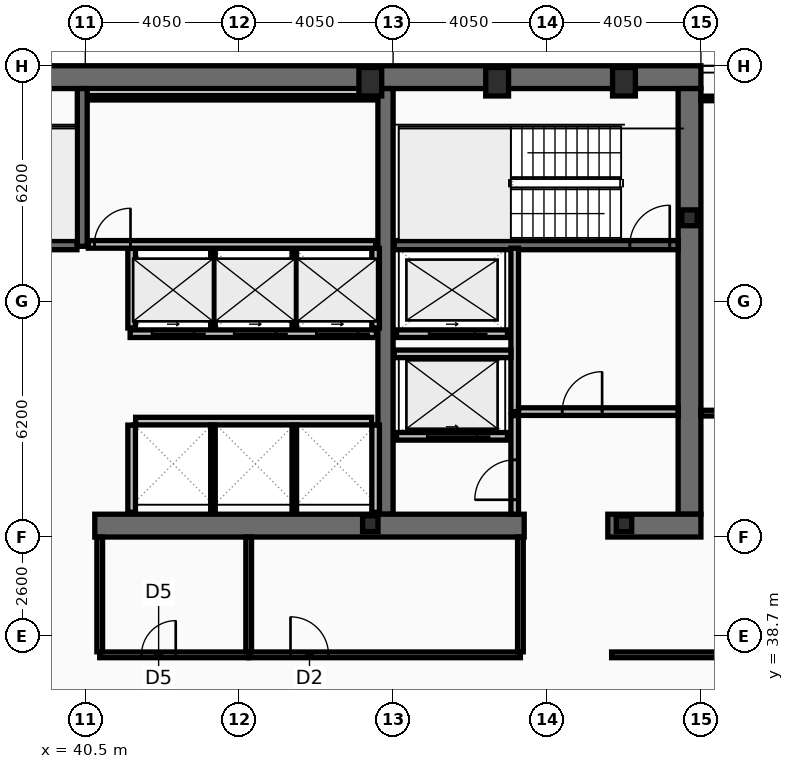
"""IFC4 building model, lengths in metres.
Left out: names, types, materials, properties, quantities, classifications, styles, units other than length and angle.
Written with IfcOpenShell. Run it as: python <this file> out.ifc"""

import sys

from ifc_helpers import new_model, si_unit, direction, frame, frame_2d, origin, origin_2d, place, context, subcontext, project, spatial, rectangle, hollow_rectangle, i_section, extrude, element, fill, save


model = new_model("IFC4")
c1 = context("Model", 3, precision=1e-05, world=origin(), true_north=direction((0.0, 1.0)))
c2 = subcontext(c1, "Body", "Model", "MODEL_VIEW")
j1 = project(units=[si_unit("LENGTHUNIT", "METRE"), si_unit("PLANEANGLEUNIT", "RADIAN")], contexts=[c1])
p1 = place(None, origin())
s1 = spatial("IfcSite", under=j1, at=p1, CompositionType="ELEMENT")
p2 = place(p1, origin())
s2 = spatial("IfcBuilding", under=s1, at=p2, CompositionType="ELEMENT")
p3 = place(p2, frame((0.0, 0.0, 231.8)))
s3 = spatial("IfcBuildingStorey", under=s2, at=p3, CompositionType="ELEMENT", Elevation=231.8)
p4 = place(p3, frame((16.2, 53.4, 0.0), z_axis=(0.0, 0.0, 1.0), x_axis=(1.0, 0.0, 0.0)))
e1 = element("IfcWall", 1, at=p4, inside=s3, PredefinedType="SHEAR", context=c2, shape_type="SweptSolid", body=[
    extrude(rectangle(XDim=40.5, YDim=0.6, at=frame_2d((20.25, 0.0))), origin(), (0.0, 0.0, 1.0), 3.44),
])
p5 = place(p3, frame((56.4, 53.1, 0.0), z_axis=(0.0, 0.0, 1.0), x_axis=(0.0, -1.0, 0.0)))
e2 = element("IfcWall", 2, at=p5, inside=s3, PredefinedType="SHEAR", context=c2, shape_type="SweptSolid", body=[
    extrude(rectangle(XDim=11.2, YDim=0.6, at=frame_2d((5.6, 0.0))), origin(), (0.0, 0.0, 1.0), 3.44),
])
p6 = place(p3, frame((48.4, 41.9, 0.0), z_axis=(0.0, 0.0, 1.0), x_axis=(0.0, 1.0, 0.0)))
e3 = element("IfcWall", 3, at=p6, inside=s3, PredefinedType="SHEAR", context=c2, shape_type="SweptSolid", body=[
    extrude(rectangle(XDim=11.2, YDim=0.4, at=frame_2d((5.6, 0.0))), origin(), (0.0, 0.0, 1.0), 3.44),
])
p7 = place(p3, frame((52.05, 41.6, 0.0), z_axis=(0.0, 0.0, 1.0), x_axis=(-1.0, 0.0, 0.0)))
e4 = element("IfcWall", 4, at=p7, inside=s3, PredefinedType="SHEAR", context=c2, shape_type="SweptSolid", body=[
    extrude(rectangle(XDim=11.3, YDim=0.6, at=frame_2d((5.65, 0.0))), origin(), (0.0, 0.0, 1.0), 3.44),
])
p8 = place(p3, frame((56.7, 41.6, 0.0), z_axis=(0.0, 0.0, 1.0), x_axis=(-1.0, 0.0, 0.0)))
e5 = element("IfcWall", 5, at=p8, inside=s3, PredefinedType="SHEAR", context=c2, shape_type="SweptSolid", body=[
    extrude(rectangle(XDim=2.45, YDim=0.6, at=frame_2d((1.225, 0.0))), origin(), (0.0, 0.0, 1.0), 3.44),
])
p9 = place(p3, frame((40.42, 48.95, 0.0), z_axis=(0.0, 0.0, 1.0), x_axis=(0.0, 1.0, 0.0)))
e6 = element("IfcWall", 6, at=p9, inside=s3, PredefinedType="SHEAR", context=c2, shape_type="SweptSolid", body=[
    extrude(rectangle(XDim=4.15, YDim=0.26, at=frame_2d((2.075, 0.0))), origin(), (0.0, 0.0, 1.0), 3.44),
])
p10 = place(p3, frame((48.63, 48.98, 0.0), z_axis=(0.0, 0.0, 1.0), x_axis=(1.0, 0.0, 0.0)))
e7 = element("IfcWall", 7, at=p10, inside=s3, PredefinedType="SHEAR", context=c2, shape_type="SweptSolid", body=[
    extrude(rectangle(XDim=7.47, YDim=0.24, at=frame_2d((3.735, 0.0))), origin(), (0.0, 0.0, 1.0), 3.44),
])
p11 = place(p10, frame((6.2, 0.0, 0.0)))
e8 = element("IfcOpeningElement", 8, at=p11, cuts=e7, PredefinedType="OPENING", context=c2, shape_type="SweptSolid", body=[
    extrude(rectangle(XDim=1.05, YDim=2.15, at=frame_2d((0.525, 1.075))), frame((0.0, 0.13, 0.0), z_axis=(0.0, -1.0, 0.0), x_axis=(1.0, 0.0, 0.0)), (0.0, 0.0, 1.0), 0.26),
])
p12 = place(p3, frame((32.72, 48.98, 0.0), z_axis=(0.0, 0.0, 1.0), x_axis=(1.0, 0.0, 0.0)))
e9 = element("IfcWall", 9, at=p12, inside=s3, PredefinedType="SHEAR", context=c2, shape_type="SweptSolid", body=[
    extrude(rectangle(XDim=7.56, YDim=0.24, at=frame_2d((3.78, 0.0))), origin(), (0.0, 0.0, 1.0), 3.44),
])
p13 = place(p12, frame((0.22, 0.0, 0.0)))
e10 = element("IfcOpeningElement", 10, at=p13, cuts=e9, PredefinedType="OPENING", context=c2, shape_type="SweptSolid", body=[
    extrude(rectangle(XDim=1.05, YDim=2.15, at=frame_2d((0.525, 1.075))), frame((0.0, 0.13, 0.0), z_axis=(0.0, -1.0, 0.0), x_axis=(1.0, 0.0, 0.0)), (0.0, 0.0, 1.0), 0.26),
])
for number, where, z_axis, x_axis in (
    (11, (48.0, 53.28, 0.0), (0.0, 0.0, 1.0), (1.0, 0.0, 0.0)),
    (12, (51.337, 53.28, 0.0), (0.0, 0.0, 1.0), (1.0, 0.0, 0.0)),
    (13, (54.675, 53.28, 0.0), (0.0, 0.0, 1.0), (1.0, 0.0, 0.0)),
):
    element("IfcColumn", number, at=place(p3, frame(where, z_axis=z_axis, x_axis=x_axis)), inside=s3, PredefinedType="COLUMN", context=c2, shape_type="SweptSolid", body=[
        extrude(hollow_rectangle(XDim=0.6, YDim=0.75, WallThickness=0.045, at=origin_2d()), origin(), (0.0, 0.0, 1.0), 3.6),
    ])
for number, where, z_axis, x_axis in (
    (14, (56.4, 49.7, 0.0), (0.0, 0.0, 1.0), (1.0, 0.0, 0.0)),
    (15, (48.0, 41.65, 0.0), (0.0, 0.0, 1.0), (1.0, 0.0, 0.0)),
    (16, (54.675, 41.65, 0.0), (0.0, 0.0, 1.0), (1.0, 0.0, 0.0)),
):
    element("IfcColumn", number, at=place(p3, frame(where, z_axis=z_axis, x_axis=x_axis)), inside=s3, PredefinedType="COLUMN", context=c2, shape_type="SweptSolid", body=[
        extrude(i_section(OverallWidth=0.406, OverallDepth=0.416, WebThickness=0.03, FlangeThickness=0.048, at=origin_2d()), origin(), (0.0, 0.0, 1.0), 3.6),
    ])
p14 = place(p3, frame((51.61, 43.95, 0.0), z_axis=(0.0, 0.0, 1.0), x_axis=(-1.0, 0.0, 0.0)))
e17 = element("IfcWall", 17, at=p14, inside=s3, PredefinedType="PARTITIONING", context=c2, shape_type="SweptSolid", body=[
    extrude(rectangle(XDim=2.92, YDim=0.2, at=frame_2d((1.46, 0.0))), origin(), (0.0, 0.0, 1.0), 3.44),
])
p15 = place(p14, frame((0.81, 0.0, 0.0)))
e18 = element("IfcOpeningElement", 18, at=p15, cuts=e17, PredefinedType="OPENING", context=c2, shape_type="SweptSolid", body=[
    extrude(rectangle(XDim=1.3, YDim=2.18, at=frame_2d((0.65, 1.09))), frame((0.0, 0.11, 0.0), z_axis=(0.0, -1.0, 0.0), x_axis=(1.0, 0.0, 0.0)), (0.0, 0.0, 1.0), 0.22),
])
p16 = place(p3, frame((51.61, 46.65, 0.0), z_axis=(0.0, 0.0, 1.0), x_axis=(-1.0, 0.0, 0.0)))
e19 = element("IfcWall", 19, at=p16, inside=s3, PredefinedType="PARTITIONING", context=c2, shape_type="SweptSolid", body=[
    extrude(rectangle(XDim=2.92, YDim=0.2, at=frame_2d((1.46, 0.0))), origin(), (0.0, 0.0, 1.0), 3.44),
])
p17 = place(p16, frame((0.86, 0.0, 0.0)))
e20 = element("IfcOpeningElement", 20, at=p17, cuts=e19, PredefinedType="OPENING", context=c2, shape_type="SweptSolid", body=[
    extrude(rectangle(XDim=1.2, YDim=2.18, at=frame_2d((0.6, 1.09))), frame((0.0, 0.11, 0.0), z_axis=(0.0, -1.0, 0.0), x_axis=(1.0, 0.0, 0.0)), (0.0, 0.0, 1.0), 0.22),
])
p18 = place(p3, frame((48.16, 46.65, 0.0), z_axis=(0.0, 0.0, 1.0), x_axis=(-1.0, 0.0, 0.0)))
e21 = element("IfcWall", 21, at=p18, inside=s3, PredefinedType="PARTITIONING", context=c2, shape_type="SweptSolid", body=[
    extrude(rectangle(XDim=6.48, YDim=0.2, at=frame_2d((3.24, 0.0))), origin(), (0.0, 0.0, 1.0), 3.44),
])
p19 = place(p18, frame((4.8, 0.0, 0.0)))
e22 = element("IfcOpeningElement", 22, at=p19, cuts=e21, PredefinedType="OPENING", context=c2, shape_type="SweptSolid", body=[
    extrude(rectangle(XDim=1.1, YDim=2.18, at=frame_2d((0.55, 1.09))), frame((0.0, 0.11, 0.0), z_axis=(0.0, -1.0, 0.0), x_axis=(1.0, 0.0, 0.0)), (0.0, 0.0, 1.0), 0.22),
])
p20 = place(p18, frame((2.64, 0.0, 0.0)))
e23 = element("IfcOpeningElement", 23, at=p20, cuts=e21, PredefinedType="OPENING", context=c2, shape_type="SweptSolid", body=[
    extrude(rectangle(XDim=1.1, YDim=2.18, at=frame_2d((0.55, 1.09))), frame((0.0, 0.11, 0.0), z_axis=(0.0, -1.0, 0.0), x_axis=(1.0, 0.0, 0.0)), (0.0, 0.0, 1.0), 0.22),
])
p21 = place(p18, frame((0.48, 0.0, 0.0)))
e24 = element("IfcOpeningElement", 24, at=p21, cuts=e21, PredefinedType="OPENING", context=c2, shape_type="SweptSolid", body=[
    extrude(rectangle(XDim=1.1, YDim=2.18, at=frame_2d((0.55, 1.09))), frame((0.0, 0.11, 0.0), z_axis=(0.0, -1.0, 0.0), x_axis=(1.0, 0.0, 0.0)), (0.0, 0.0, 1.0), 0.22),
])
p22 = place(p3, frame((51.8, 44.6, 0.0), z_axis=(0.0, 0.0, 1.0), x_axis=(0.0, 1.0, 0.0)))
e25 = element("IfcWall", 25, at=p22, inside=s3, PredefinedType="PARTITIONING", context=c2, shape_type="SweptSolid", body=[
    extrude(rectangle(XDim=4.3, YDim=0.2, at=frame_2d((2.15, 0.0))), origin(), (0.0, 0.0, 1.0), 3.44),
])
p23 = place(p3, frame((51.9, 44.6, 0.0), z_axis=(0.0, 0.0, 1.0), x_axis=(1.0, 0.0, 0.0)))
e26 = element("IfcWall", 26, at=p23, inside=s3, PredefinedType="PARTITIONING", context=c2, shape_type="SweptSolid", body=[
    extrude(rectangle(XDim=4.2, YDim=0.2, at=frame_2d((2.1, 0.0))), origin(), (0.0, 0.0, 1.0), 3.44),
])
p24 = place(p23, frame((1.15, 0.0, 0.0)))
e27 = element("IfcOpeningElement", 27, at=p24, cuts=e26, PredefinedType="OPENING", context=c2, shape_type="SweptSolid", body=[
    extrude(rectangle(XDim=1.05, YDim=2.15, at=frame_2d((0.525, 1.075))), frame((0.0, 0.11, 0.0), z_axis=(0.0, -1.0, 0.0), x_axis=(1.0, 0.0, 0.0)), (0.0, 0.0, 1.0), 0.22),
])
p25 = place(p3, frame((48.63, 46.12, 0.0), z_axis=(0.0, 0.0, 1.0), x_axis=(1.0, 0.0, 0.0)))
e28 = element("IfcWall", 28, at=p25, inside=s3, PredefinedType="PARTITIONING", context=c2, shape_type="SweptSolid", body=[
    extrude(rectangle(XDim=3.07, YDim=0.2, at=frame_2d((1.535, 0.0))), origin(), (0.0, 0.0, 1.0), 3.44),
])
p26 = place(p3, frame((51.8, 41.9, 0.0), z_axis=(0.0, 0.0, 1.0), x_axis=(0.0, 1.0, 0.0)))
e29 = element("IfcWall", 29, at=p26, inside=s3, PredefinedType="PARTITIONING", context=c2, shape_type="SweptSolid", body=[
    extrude(rectangle(XDim=2.595, YDim=0.2, at=frame_2d((1.298, 0.0))), origin(), (0.0, 0.0, 1.0), 3.44),
])
p27 = place(p26, frame((0.38, 0.0, 0.0)))
e30 = element("IfcOpeningElement", 30, at=p27, cuts=e29, PredefinedType="OPENING", context=c2, shape_type="SweptSolid", body=[
    extrude(rectangle(XDim=1.05, YDim=2.15, at=frame_2d((0.525, 1.075))), frame((0.0, 0.11, 0.0), z_axis=(0.0, -1.0, 0.0), x_axis=(1.0, 0.0, 0.0)), (0.0, 0.0, 1.0), 0.22),
])
for number, where, z_axis, x_axis in (
    (31, (41.72, 46.8, 0.0), (0.0, 0.0, 1.0), (0.0, 1.0, 0.0)),
    (32, (48.14, 46.8, 0.0), (0.0, 0.0, 1.0), (0.0, 1.0, 0.0)),
):
    element("IfcWall", number, at=place(p3, frame(where, z_axis=z_axis, x_axis=x_axis)), inside=s3, PredefinedType="PARTITIONING", context=c2, shape_type="SweptSolid", body=[
        extrude(rectangle(XDim=2.095, YDim=0.2, at=frame_2d((1.047, 0.0))), origin(), (0.0, 0.0, 1.0), 3.44),
    ])
for number, where, z_axis, x_axis in (
    (33, (43.86, 46.8, 0.0), (0.0, 0.0, 1.0), (0.0, 1.0, 0.0)),
    (34, (46.0, 46.8, 0.0), (0.0, 0.0, 1.0), (0.0, 1.0, 0.0)),
):
    element("IfcWall", number, at=place(p3, frame(where, z_axis=z_axis, x_axis=x_axis)), inside=s3, PredefinedType="PARTITIONING", context=c2, shape_type="SweptSolid", body=[
        extrude(rectangle(XDim=2.095, YDim=0.12, at=frame_2d((1.047, 0.0))), origin(), (0.0, 0.0, 1.0), 3.44),
    ])
p28 = place(p3, frame((41.825, 44.35, 0.0), z_axis=(0.0, 0.0, 1.0), x_axis=(1.0, 0.0, 0.0)))
e35 = element("IfcWall", 35, at=p28, inside=s3, PredefinedType="PARTITIONING", context=c2, shape_type="SweptSolid", body=[
    extrude(rectangle(XDim=6.21, YDim=0.2, at=frame_2d((3.105, 0.0))), origin(), (0.0, 0.0, 1.0), 3.44),
])
for number, where, z_axis, x_axis in (
    (36, (41.72, 41.95, 0.0), (0.0, 0.0, 1.0), (0.0, 1.0, 0.0)),
    (37, (48.14, 41.95, 0.0), (0.0, 0.0, 1.0), (0.0, 1.0, 0.0)),
):
    element("IfcWall", number, at=place(p3, frame(where, z_axis=z_axis, x_axis=x_axis)), inside=s3, PredefinedType="PARTITIONING", context=c2, shape_type="SweptSolid", body=[
        extrude(rectangle(XDim=2.295, YDim=0.2, at=frame_2d((1.147, 0.0))), origin(), (0.0, 0.0, 1.0), 3.44),
    ])
for number, where, z_axis, x_axis in (
    (38, (43.86, 41.95, 0.0), (0.0, 0.0, 1.0), (0.0, 1.0, 0.0)),
    (39, (46.0, 41.95, 0.0), (0.0, 0.0, 1.0), (0.0, 1.0, 0.0)),
):
    element("IfcWall", number, at=place(p3, frame(where, z_axis=z_axis, x_axis=x_axis)), inside=s3, PredefinedType="PARTITIONING", context=c2, shape_type="SweptSolid", body=[
        extrude(rectangle(XDim=2.295, YDim=0.12, at=frame_2d((1.147, 0.0))), origin(), (0.0, 0.0, 1.0), 3.44),
    ])
p29 = place(p3, frame((40.58, 52.86, 0.0), z_axis=(0.0, 0.0, 1.0), x_axis=(1.0, 0.0, 0.0)))
e40 = element("IfcWall", 40, at=p29, inside=s3, PredefinedType="PARTITIONING", context=c2, shape_type="SweptSolid", body=[
    extrude(rectangle(XDim=7.56, YDim=0.12, at=frame_2d((3.78, 0.0))), origin(), (0.0, 0.0, 1.0), 3.44),
])
p30 = place(p3, frame((40.58, 49.0, 0.0), z_axis=(0.0, 0.0, 1.0), x_axis=(1.0, 0.0, 0.0)))
e41 = element("IfcWall", 41, at=p30, inside=s3, PredefinedType="PARTITIONING", context=c2, shape_type="SweptSolid", body=[
    extrude(rectangle(XDim=7.56, YDim=0.2, at=frame_2d((3.78, 0.0))), origin(), (0.0, 0.0, 1.0), 3.44),
])
p31 = place(p30, frame((0.16, 0.0, 0.0)))
e42 = element("IfcOpeningElement", 42, at=p31, cuts=e41, PredefinedType="OPENING", context=c2, shape_type="SweptSolid", body=[
    extrude(rectangle(XDim=0.95, YDim=2.1, at=frame_2d((0.475, 1.05))), frame((0.0, 0.11, 0.0), z_axis=(0.0, -1.0, 0.0), x_axis=(1.0, 0.0, 0.0)), (0.0, 0.0, 1.0), 0.22),
])
p32 = place(p3, frame((40.88, 38.2, 0.0), z_axis=(0.0, 0.0, 1.0), x_axis=(1.0, 0.0, 0.0)))
e43 = element("IfcWall", 43, at=p32, inside=s3, PredefinedType="PARTITIONING", context=c2, shape_type="SweptSolid", body=[
    extrude(rectangle(XDim=3.92, YDim=0.15, at=frame_2d((1.96, 0.0))), origin(), (0.0, 0.0, 1.0), 2.78),
])
p33 = place(p32, frame((1.1, 0.0, 0.0)))
e44 = element("IfcOpeningElement", 44, at=p33, cuts=e43, PredefinedType="OPENING", context=c2, shape_type="SweptSolid", body=[
    extrude(rectangle(XDim=0.9, YDim=2.05, at=frame_2d((0.45, 1.025))), frame((0.0, 0.085, 0.0), z_axis=(0.0, -1.0, 0.0), x_axis=(1.0, 0.0, 0.0)), (0.0, 0.0, 1.0), 0.17),
])
p34 = place(p3, frame((44.8, 38.2, 0.0), z_axis=(0.0, 0.0, 1.0), x_axis=(1.0, 0.0, 0.0)))
e45 = element("IfcWall", 45, at=p34, inside=s3, PredefinedType="PARTITIONING", context=c2, shape_type="SweptSolid", body=[
    extrude(rectangle(XDim=7.15, YDim=0.15, at=frame_2d((3.575, 0.0))), origin(), (0.0, 0.0, 1.0), 2.78),
])
p35 = place(p34, frame((1.1, 0.0, 0.0)))
e46 = element("IfcOpeningElement", 46, at=p35, cuts=e45, PredefinedType="OPENING", context=c2, shape_type="SweptSolid", body=[
    extrude(rectangle(XDim=1.0, YDim=2.05, at=frame_2d((0.5, 1.025))), frame((0.0, 0.085, 0.0), z_axis=(0.0, -1.0, 0.0), x_axis=(1.0, 0.0, 0.0)), (0.0, 0.0, 1.0), 0.17),
])
for number, where, z_axis, x_axis in (
    (47, (40.88, 38.28, 0.0), (0.0, 0.0, 1.0), (0.0, 1.0, 0.0)),
    (48, (44.8, 38.28, 0.0), (0.0, 0.0, 1.0), (0.0, 1.0, 0.0)),
    (49, (51.95, 38.28, 0.0), (0.0, 0.0, 1.0), (0.0, 1.0, 0.0)),
):
    element("IfcWall", number, at=place(p3, frame(where, z_axis=z_axis, x_axis=x_axis)), inside=s3, PredefinedType="PARTITIONING", context=c2, shape_type="SweptSolid", body=[
        extrude(rectangle(XDim=3.02, YDim=0.15, at=frame_2d((1.51, 0.0))), origin(), (0.0, 0.0, 1.0), 3.44),
    ])
p36 = place(p3, frame((54.35, 38.2, 0.0), z_axis=(0.0, 0.0, 1.0), x_axis=(1.0, 0.0, 0.0)))
e50 = element("IfcWall", 50, at=p36, inside=s3, PredefinedType="PARTITIONING", context=c2, shape_type="SweptSolid", body=[
    extrude(rectangle(XDim=10.52, YDim=0.15, at=frame_2d((5.26, 0.0))), origin(), (0.0, 0.0, 1.0), 2.78),
])
p37 = place(p36, frame((3.25, 0.0, 0.0)))
e51 = element("IfcOpeningElement", 51, at=p37, cuts=e50, PredefinedType="OPENING", context=c2, shape_type="SweptSolid", body=[
    extrude(rectangle(XDim=0.95, YDim=2.05, at=frame_2d((0.475, 1.025))), frame((0.0, 0.085, 0.0), z_axis=(0.0, -1.0, 0.0), x_axis=(1.0, 0.0, 0.0)), (0.0, 0.0, 1.0), 0.17),
])
p38 = place(p3, frame((56.7, 44.56, 0.0), z_axis=(0.0, 0.0, 1.0), x_axis=(1.0, 0.0, 0.0)))
e52 = element("IfcWall", 52, at=p38, inside=s3, PredefinedType="PARTITIONING", context=c2, shape_type="SweptSolid", body=[
    extrude(rectangle(XDim=8.105, YDim=0.15, at=frame_2d((4.052, 0.0))), origin(), (0.0, 0.0, 1.0), 2.83),
])
p39 = place(p38, frame((0.9, 0.0, 0.0)))
e53 = element("IfcOpeningElement", 53, at=p39, cuts=e52, PredefinedType="OPENING", context=c2, shape_type="SweptSolid", body=[
    extrude(rectangle(XDim=0.9, YDim=2.05, at=frame_2d((0.45, 1.025))), frame((0.0, 0.085, 0.0), z_axis=(0.0, -1.0, 0.0), x_axis=(1.0, 0.0, 0.0)), (0.0, 0.0, 1.0), 0.17),
])
p40 = place(p3, frame((56.7, 52.84, 0.0), z_axis=(0.0, 0.0, 1.0), x_axis=(1.0, 0.0, 0.0)))
e54 = element("IfcWall", 54, at=p40, inside=s3, PredefinedType="PARTITIONING", context=c2, shape_type="SweptSolid", body=[
    extrude(rectangle(XDim=8.105, YDim=0.12, at=frame_2d((4.052, 0.0))), origin(), (0.0, 0.0, 1.0), 3.44),
])
p41 = place(p11, origin())
e55 = element("IfcDoor", 55, at=p41, inside=s3, OperationType="SINGLE_SWING_RIGHT", PredefinedType="DOOR", context=c2, shape_type="SweptSolid", body=[
    extrude(rectangle(XDim=1.05, YDim=2.15, at=frame_2d((0.525, 1.075))), frame((0.0, 0.025, 0.0), z_axis=(0.0, -1.0, 0.0), x_axis=(1.0, 0.0, 0.0)), (0.0, 0.0, 1.0), 0.05),
])
fill(e8, e55)
p42 = place(p15, origin())
e56 = element("IfcDoor", 56, at=p42, inside=s3, OperationType="SLIDING_TO_LEFT", PredefinedType="DOOR", context=c2, shape_type="SweptSolid", body=[
    extrude(rectangle(XDim=1.3, YDim=2.18, at=frame_2d((0.65, 1.09))), frame((0.0, 0.025, 0.0), z_axis=(0.0, -1.0, 0.0), x_axis=(1.0, 0.0, 0.0)), (0.0, 0.0, 1.0), 0.05),
])
fill(e18, e56)
p43 = place(p17, origin())
e57 = element("IfcDoor", 57, at=p43, inside=s3, OperationType="SLIDING_TO_LEFT", PredefinedType="DOOR", context=c2, shape_type="SweptSolid", body=[
    extrude(rectangle(XDim=1.2, YDim=2.18, at=frame_2d((0.6, 1.09))), frame((0.0, 0.025, 0.0), z_axis=(0.0, -1.0, 0.0), x_axis=(1.0, 0.0, 0.0)), (0.0, 0.0, 1.0), 0.05),
])
fill(e20, e57)
p44 = place(p19, origin())
e58 = element("IfcDoor", 58, at=p44, inside=s3, OperationType="SLIDING_TO_LEFT", PredefinedType="DOOR", context=c2, shape_type="SweptSolid", body=[
    extrude(rectangle(XDim=1.1, YDim=2.18, at=frame_2d((0.55, 1.09))), frame((0.0, 0.025, 0.0), z_axis=(0.0, -1.0, 0.0), x_axis=(1.0, 0.0, 0.0)), (0.0, 0.0, 1.0), 0.05),
])
fill(e22, e58)
p45 = place(p20, origin())
e59 = element("IfcDoor", 59, at=p45, inside=s3, OperationType="SLIDING_TO_LEFT", PredefinedType="DOOR", context=c2, shape_type="SweptSolid", body=[
    extrude(rectangle(XDim=1.1, YDim=2.18, at=frame_2d((0.55, 1.09))), frame((0.0, 0.025, 0.0), z_axis=(0.0, -1.0, 0.0), x_axis=(1.0, 0.0, 0.0)), (0.0, 0.0, 1.0), 0.05),
])
fill(e23, e59)
p46 = place(p21, origin())
e60 = element("IfcDoor", 60, at=p46, inside=s3, OperationType="SLIDING_TO_LEFT", PredefinedType="DOOR", context=c2, shape_type="SweptSolid", body=[
    extrude(rectangle(XDim=1.1, YDim=2.18, at=frame_2d((0.55, 1.09))), frame((0.0, 0.025, 0.0), z_axis=(0.0, -1.0, 0.0), x_axis=(1.0, 0.0, 0.0)), (0.0, 0.0, 1.0), 0.05),
])
fill(e24, e60)
p47 = place(p24, origin())
e61 = element("IfcDoor", 61, at=p47, inside=s3, OperationType="SINGLE_SWING_RIGHT", PredefinedType="DOOR", context=c2, shape_type="SweptSolid", body=[
    extrude(rectangle(XDim=1.05, YDim=2.15, at=frame_2d((0.525, 1.075))), frame((0.0, 0.025, 0.0), z_axis=(0.0, -1.0, 0.0), x_axis=(1.0, 0.0, 0.0)), (0.0, 0.0, 1.0), 0.05),
])
fill(e27, e61)
p48 = place(p27, origin())
e62 = element("IfcDoor", 62, at=p48, inside=s3, OperationType="SINGLE_SWING_LEFT", PredefinedType="DOOR", context=c2, shape_type="SweptSolid", body=[
    extrude(rectangle(XDim=1.05, YDim=2.15, at=frame_2d((0.525, 1.075))), frame((0.0, 0.025, 0.0), z_axis=(0.0, -1.0, 0.0), x_axis=(1.0, 0.0, 0.0)), (0.0, 0.0, 1.0), 0.05),
])
fill(e30, e62)
p49 = place(p31, origin())
e63 = element("IfcDoor", 63, at=p49, inside=s3, OperationType="SINGLE_SWING_RIGHT", PredefinedType="DOOR", context=c2, shape_type="SweptSolid", body=[
    extrude(rectangle(XDim=0.95, YDim=2.1, at=frame_2d((0.475, 1.05))), frame((0.0, 0.025, 0.0), z_axis=(0.0, -1.0, 0.0), x_axis=(1.0, 0.0, 0.0)), (0.0, 0.0, 1.0), 0.05),
])
fill(e42, e63)
p50 = place(p33, origin())
e64 = element("IfcDoor", 64, at=p50, inside=s3, OperationType="SINGLE_SWING_RIGHT", PredefinedType="DOOR", context=c2, shape_type="SweptSolid", body=[
    extrude(rectangle(XDim=0.9, YDim=2.05, at=frame_2d((0.45, 1.025))), frame((0.0, 0.025, 0.0), z_axis=(0.0, -1.0, 0.0), x_axis=(1.0, 0.0, 0.0)), (0.0, 0.0, 1.0), 0.05),
])
fill(e44, e64)
p51 = place(p35, origin())
e65 = element("IfcDoor", 65, at=p51, inside=s3, OperationType="SINGLE_SWING_LEFT", PredefinedType="DOOR", context=c2, shape_type="SweptSolid", body=[
    extrude(rectangle(XDim=1.0, YDim=2.05, at=frame_2d((0.5, 1.025))), frame((0.0, 0.025, 0.0), z_axis=(0.0, -1.0, 0.0), x_axis=(1.0, 0.0, 0.0)), (0.0, 0.0, 1.0), 0.05),
])
fill(e46, e65)
save(model, sys.argv[1])
